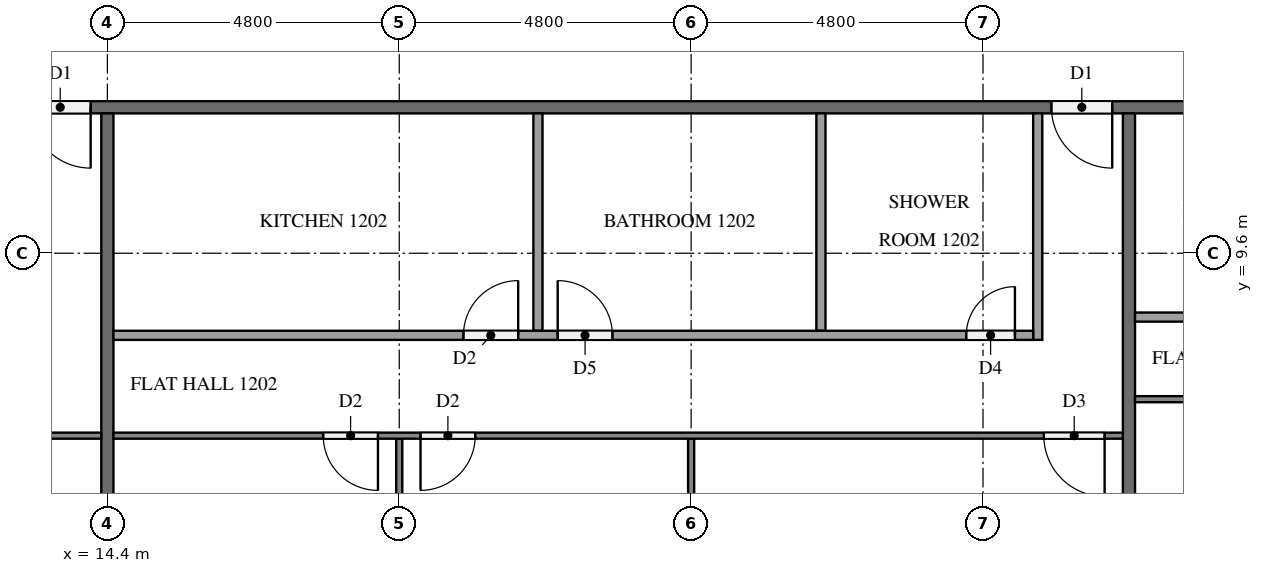
"""IFC4 building model, lengths in metres.
Left out: names, types, materials, properties, quantities, classifications, styles, units other than length and angle.
Written with IfcOpenShell. Run it as: python <this file> out.ifc"""

import sys

from ifc_helpers import new_model, si_unit, direction, frame, frame_2d, origin, place, context, subcontext, project, spatial, rectangle, extrude, element, fill, save


model = new_model("IFC4")
c1 = context("Model", 3, precision=1e-05, world=origin(), true_north=direction((0.0, 1.0)))
c2 = subcontext(c1, "Body", "Model", "MODEL_VIEW")
j1 = project(units=[si_unit("LENGTHUNIT", "METRE"), si_unit("PLANEANGLEUNIT", "RADIAN")], contexts=[c1])
p1 = place(None, origin())
s1 = spatial("IfcSite", under=j1, at=p1, CompositionType="ELEMENT")
p2 = place(p1, origin())
s2 = spatial("IfcBuilding", under=s1, at=p2, CompositionType="ELEMENT")
p3 = place(p2, frame((0.0, 0.0, 50.4)))
s3 = spatial("IfcBuildingStorey", under=s2, at=p3, CompositionType="ELEMENT", Elevation=50.4)
p4 = place(p3, frame((50.5, 12.0, 0.0), z_axis=(0.0, 0.0, 1.0), x_axis=(-1.0, 0.0, 0.0)))
e1 = element("IfcWall", 1, at=p4, inside=s3, PredefinedType="PARTITIONING", context=c2, shape_type="SweptSolid", body=[
    extrude(rectangle(XDim=38.6, YDim=0.2, at=frame_2d((19.3, 0.0))), origin(), (0.0, 0.0, 1.0), 3.1),
])
p5 = place(p4, frame((36.375, 0.0, 0.0)))
e2 = element("IfcOpeningElement", 2, at=p5, cuts=e1, PredefinedType="OPENING", context=c2, shape_type="SweptSolid", body=[
    extrude(rectangle(XDim=1.0, YDim=2.1, at=frame_2d((0.5, 1.05))), frame((0.0, 0.11, 0.0), z_axis=(0.0, -1.0, 0.0), x_axis=(1.0, 0.0, 0.0)), (0.0, 0.0, 1.0), 0.22),
])
p6 = place(p4, frame((19.575, 0.0, 0.0)))
e3 = element("IfcOpeningElement", 3, at=p6, cuts=e1, PredefinedType="OPENING", context=c2, shape_type="SweptSolid", body=[
    extrude(rectangle(XDim=1.0, YDim=2.1, at=frame_2d((0.5, 1.05))), frame((0.0, 0.11, 0.0), z_axis=(0.0, -1.0, 0.0), x_axis=(1.0, 0.0, 0.0)), (0.0, 0.0, 1.0), 0.22),
])
p7 = place(p4, frame((7.575, 0.0, 0.0)))
e4 = element("IfcOpeningElement", 4, at=p7, cuts=e1, PredefinedType="OPENING", context=c2, shape_type="SweptSolid", body=[
    extrude(rectangle(XDim=1.0, YDim=2.1, at=frame_2d((0.5, 1.05))), frame((0.0, 0.11, 0.0), z_axis=(0.0, -1.0, 0.0), x_axis=(1.0, 0.0, 0.0)), (0.0, 0.0, 1.0), 0.22),
])
p8 = place(p4, frame((0.375, 0.0, 0.0)))
e5 = element("IfcOpeningElement", 5, at=p8, cuts=e1, PredefinedType="OPENING", context=c2, shape_type="SweptSolid", body=[
    extrude(rectangle(XDim=1.0, YDim=2.1, at=frame_2d((0.5, 1.05))), frame((0.0, 0.11, 0.0), z_axis=(0.0, -1.0, 0.0), x_axis=(1.0, 0.0, 0.0)), (0.0, 0.0, 1.0), 0.22),
])
p9 = place(p3, frame((14.4, 11.9, 0.0), z_axis=(0.0, 0.0, 1.0), x_axis=(0.0, -1.0, 0.0)))
e6 = element("IfcWall", 6, at=p9, inside=s3, PredefinedType="PARTITIONING", context=c2, shape_type="SweptSolid", body=[
    extrude(rectangle(XDim=11.45, YDim=0.2, at=frame_2d((5.725, 0.0))), origin(), (0.0, 0.0, 1.0), 3.1),
])
p10 = place(p3, frame((31.2, 11.9, 0.0), z_axis=(0.0, 0.0, 1.0), x_axis=(0.0, -1.0, 0.0)))
e7 = element("IfcWall", 7, at=p10, inside=s3, PredefinedType="PARTITIONING", context=c2, shape_type="SweptSolid", body=[
    extrude(rectangle(XDim=11.8, YDim=0.2, at=frame_2d((5.9, 0.0))), origin(), (0.0, 0.0, 1.0), 3.1),
])
p11 = place(p3, frame((14.3, 6.6, 0.0), z_axis=(0.0, 0.0, 1.0), x_axis=(-1.0, 0.0, 0.0)))
e8 = element("IfcWall", 8, at=p11, inside=s3, PredefinedType="PARTITIONING", context=c2, shape_type="SweptSolid", body=[
    extrude(rectangle(XDim=14.2, YDim=0.1, at=frame_2d((7.1, 0.0))), origin(), (0.0, 0.0, 1.0), 3.1),
])
p12 = place(p11, frame((3.45, 0.0, 0.0)))
e9 = element("IfcOpeningElement", 9, at=p12, cuts=e8, PredefinedType="OPENING", context=c2, shape_type="SweptSolid", body=[
    extrude(rectangle(XDim=0.9, YDim=2.1, at=frame_2d((0.45, 1.05))), frame((0.0, 0.06, 0.0), z_axis=(0.0, -1.0, 0.0), x_axis=(1.0, 0.0, 0.0)), (0.0, 0.0, 1.0), 0.12),
])
p13 = place(p11, frame((5.05, 0.0, 0.0)))
e10 = element("IfcOpeningElement", 10, at=p13, cuts=e8, PredefinedType="OPENING", context=c2, shape_type="SweptSolid", body=[
    extrude(rectangle(XDim=0.9, YDim=2.1, at=frame_2d((0.45, 1.05))), frame((0.0, 0.06, 0.0), z_axis=(0.0, -1.0, 0.0), x_axis=(1.0, 0.0, 0.0)), (0.0, 0.0, 1.0), 0.12),
])
p14 = place(p11, frame((12.6, 0.0, 0.0)))
e11 = element("IfcOpeningElement", 11, at=p14, cuts=e8, PredefinedType="OPENING", context=c2, shape_type="SweptSolid", body=[
    extrude(rectangle(XDim=1.0, YDim=2.1, at=frame_2d((0.5, 1.05))), frame((0.0, 0.06, 0.0), z_axis=(0.0, -1.0, 0.0), x_axis=(1.0, 0.0, 0.0)), (0.0, 0.0, 1.0), 0.12),
])
p15 = place(p3, frame((24.0, 6.55, 0.0), z_axis=(0.0, 0.0, 1.0), x_axis=(0.0, -1.0, 0.0)))
e12 = element("IfcWall", 12, at=p15, inside=s3, PredefinedType="PARTITIONING", context=c2, shape_type="SweptSolid", body=[
    extrude(rectangle(XDim=6.1, YDim=0.1, at=frame_2d((3.05, 0.0))), origin(), (0.0, 0.0, 1.0), 3.1),
])
p16 = place(p3, frame((19.2, 6.55, 0.0), z_axis=(0.0, 0.0, 1.0), x_axis=(0.0, -1.0, 0.0)))
e13 = element("IfcWall", 13, at=p16, inside=s3, PredefinedType="PARTITIONING", context=c2, shape_type="SweptSolid", body=[
    extrude(rectangle(XDim=6.45, YDim=0.1, at=frame_2d((3.225, 0.0))), origin(), (0.0, 0.0, 1.0), 3.1),
])
p17 = place(p3, frame((31.1, 6.6, 0.0), z_axis=(0.0, 0.0, 1.0), x_axis=(-1.0, 0.0, 0.0)))
e14 = element("IfcWall", 14, at=p17, inside=s3, PredefinedType="PARTITIONING", context=c2, shape_type="SweptSolid", body=[
    extrude(rectangle(XDim=16.6, YDim=0.1, at=frame_2d((8.3, 0.0))), origin(), (0.0, 0.0, 1.0), 3.1),
])
p18 = place(p17, frame((0.3, 0.0, 0.0)))
e15 = element("IfcOpeningElement", 15, at=p18, cuts=e14, PredefinedType="OPENING", context=c2, shape_type="SweptSolid", body=[
    extrude(rectangle(XDim=1.0, YDim=2.1, at=frame_2d((0.5, 1.05))), frame((0.0, 0.06, 0.0), z_axis=(0.0, -1.0, 0.0), x_axis=(1.0, 0.0, 0.0)), (0.0, 0.0, 1.0), 0.12),
])
p19 = place(p17, frame((10.65, 0.0, 0.0)))
e16 = element("IfcOpeningElement", 16, at=p19, cuts=e14, PredefinedType="OPENING", context=c2, shape_type="SweptSolid", body=[
    extrude(rectangle(XDim=0.9, YDim=2.1, at=frame_2d((0.45, 1.05))), frame((0.0, 0.06, 0.0), z_axis=(0.0, -1.0, 0.0), x_axis=(1.0, 0.0, 0.0)), (0.0, 0.0, 1.0), 0.12),
])
p20 = place(p17, frame((12.25, 0.0, 0.0)))
e17 = element("IfcOpeningElement", 17, at=p20, cuts=e14, PredefinedType="OPENING", context=c2, shape_type="SweptSolid", body=[
    extrude(rectangle(XDim=0.9, YDim=2.1, at=frame_2d((0.45, 1.05))), frame((0.0, 0.06, 0.0), z_axis=(0.0, -1.0, 0.0), x_axis=(1.0, 0.0, 0.0)), (0.0, 0.0, 1.0), 0.12),
])
for number, where, z_axis, x_axis in (
    (18, (26.135, 11.9, 0.0), (0.0, 0.0, 1.0), (0.0, -1.0, 0.0)),
    (19, (21.481, 11.9, 0.0), (0.0, 0.0, 1.0), (0.0, -1.0, 0.0)),
):
    element("IfcWall", number, at=place(p3, frame(where, z_axis=z_axis, x_axis=x_axis)), inside=s3, PredefinedType="PARTITIONING", context=c2, shape_type="SweptSolid", body=[
        extrude(rectangle(XDim=3.575, YDim=0.15, at=frame_2d((1.788, 0.0))), origin(), (0.0, 0.0, 1.0), 3.1),
    ])
p21 = place(p3, frame((29.7, 11.9, 0.0), z_axis=(0.0, 0.0, 1.0), x_axis=(0.0, -1.0, 0.0)))
e20 = element("IfcWall", 20, at=p21, inside=s3, PredefinedType="PARTITIONING", context=c2, shape_type="SweptSolid", body=[
    extrude(rectangle(XDim=3.725, YDim=0.15, at=frame_2d((1.862, 0.0))), origin(), (0.0, 0.0, 1.0), 3.1),
])
p22 = place(p3, frame((14.5, 8.25, 0.0), z_axis=(0.0, 0.0, 1.0), x_axis=(1.0, 0.0, 0.0)))
e21 = element("IfcWall", 21, at=p22, inside=s3, PredefinedType="PARTITIONING", context=c2, shape_type="SweptSolid", body=[
    extrude(rectangle(XDim=15.125, YDim=0.15, at=frame_2d((7.562, 0.0))), origin(), (0.0, 0.0, 1.0), 3.1),
])
p23 = place(p22, frame((14.025, 0.0, 0.0)))
e22 = element("IfcOpeningElement", 22, at=p23, cuts=e21, PredefinedType="OPENING", context=c2, shape_type="SweptSolid", body=[
    extrude(rectangle(XDim=0.8, YDim=2.1, at=frame_2d((0.4, 1.05))), frame((0.0, 0.085, 0.0), z_axis=(0.0, -1.0, 0.0), x_axis=(1.0, 0.0, 0.0)), (0.0, 0.0, 1.0), 0.17),
])
p24 = place(p22, frame((7.306, 0.0, 0.0)))
e23 = element("IfcOpeningElement", 23, at=p24, cuts=e21, PredefinedType="OPENING", context=c2, shape_type="SweptSolid", body=[
    extrude(rectangle(XDim=0.9, YDim=2.1, at=frame_2d((0.45, 1.05))), frame((0.0, 0.085, 0.0), z_axis=(0.0, -1.0, 0.0), x_axis=(1.0, 0.0, 0.0)), (0.0, 0.0, 1.0), 0.17),
])
p25 = place(p22, frame((5.756, 0.0, 0.0)))
e24 = element("IfcOpeningElement", 24, at=p25, cuts=e21, PredefinedType="OPENING", context=c2, shape_type="SweptSolid", body=[
    extrude(rectangle(XDim=0.9, YDim=2.1, at=frame_2d((0.45, 1.05))), frame((0.0, 0.085, 0.0), z_axis=(0.0, -1.0, 0.0), x_axis=(1.0, 0.0, 0.0)), (0.0, 0.0, 1.0), 0.17),
])
p26 = place(p3, frame((43.1, 7.2, 0.0), z_axis=(0.0, 0.0, 1.0), x_axis=(-1.0, 0.0, 0.0)))
e25 = element("IfcWall", 25, at=p26, inside=s3, PredefinedType="PARTITIONING", context=c2, shape_type="SweptSolid", body=[
    extrude(rectangle(XDim=11.8, YDim=0.1, at=frame_2d((5.9, 0.0))), origin(), (0.0, 0.0, 1.0), 3.1),
])
p27 = place(p26, frame((3.45, 0.0, 0.0)))
e26 = element("IfcOpeningElement", 26, at=p27, cuts=e25, PredefinedType="OPENING", context=c2, shape_type="SweptSolid", body=[
    extrude(rectangle(XDim=0.9, YDim=2.1, at=frame_2d((0.45, 1.05))), frame((0.0, 0.06, 0.0), z_axis=(0.0, -1.0, 0.0), x_axis=(1.0, 0.0, 0.0)), (0.0, 0.0, 1.0), 0.12),
])
p28 = place(p26, frame((5.05, 0.0, 0.0)))
e27 = element("IfcOpeningElement", 27, at=p28, cuts=e25, PredefinedType="OPENING", context=c2, shape_type="SweptSolid", body=[
    extrude(rectangle(XDim=1.0, YDim=2.1, at=frame_2d((0.5, 1.05))), frame((0.0, 0.06, 0.0), z_axis=(0.0, -1.0, 0.0), x_axis=(1.0, 0.0, 0.0)), (0.0, 0.0, 1.0), 0.12),
])
p29 = place(p3, frame((31.3, 8.55, 0.0), z_axis=(0.0, 0.0, 1.0), x_axis=(1.0, 0.0, 0.0)))
e28 = element("IfcWall", 28, at=p29, inside=s3, PredefinedType="PARTITIONING", context=c2, shape_type="SweptSolid", body=[
    extrude(rectangle(XDim=10.325, YDim=0.15, at=frame_2d((5.163, 0.0))), origin(), (0.0, 0.0, 1.0), 3.1),
])
p30 = place(p29, frame((4.455, 0.0, 0.0)))
e29 = element("IfcOpeningElement", 29, at=p30, cuts=e28, PredefinedType="OPENING", context=c2, shape_type="SweptSolid", body=[
    extrude(rectangle(XDim=0.9, YDim=2.1, at=frame_2d((0.45, 1.05))), frame((0.0, 0.085, 0.0), z_axis=(0.0, -1.0, 0.0), x_axis=(1.0, 0.0, 0.0)), (0.0, 0.0, 1.0), 0.17),
])
p31 = place(p29, frame((3.005, 0.0, 0.0)))
e30 = element("IfcOpeningElement", 30, at=p31, cuts=e28, PredefinedType="OPENING", context=c2, shape_type="SweptSolid", body=[
    extrude(rectangle(XDim=0.8, YDim=2.1, at=frame_2d((0.4, 1.05))), frame((0.0, 0.085, 0.0), z_axis=(0.0, -1.0, 0.0), x_axis=(1.0, 0.0, 0.0)), (0.0, 0.0, 1.0), 0.17),
])
p32 = place(p5, origin())
e31 = element("IfcDoor", 31, at=p32, inside=s3, OperationType="SINGLE_SWING_LEFT", PredefinedType="DOOR", context=c2, shape_type="SweptSolid", body=[
    extrude(rectangle(XDim=1.0, YDim=2.1, at=frame_2d((0.5, 1.05))), frame((0.0, 0.025, 0.0), z_axis=(0.0, -1.0, 0.0), x_axis=(1.0, 0.0, 0.0)), (0.0, 0.0, 1.0), 0.05),
])
fill(e2, e31)
p33 = place(p6, origin())
e32 = element("IfcDoor", 32, at=p33, inside=s3, OperationType="SINGLE_SWING_LEFT", PredefinedType="DOOR", context=c2, shape_type="SweptSolid", body=[
    extrude(rectangle(XDim=1.0, YDim=2.1, at=frame_2d((0.5, 1.05))), frame((0.0, 0.025, 0.0), z_axis=(0.0, -1.0, 0.0), x_axis=(1.0, 0.0, 0.0)), (0.0, 0.0, 1.0), 0.05),
])
fill(e3, e32)
p34 = place(p18, origin())
e33 = element("IfcDoor", 33, at=p34, inside=s3, OperationType="SINGLE_SWING_LEFT", PredefinedType="DOOR", context=c2, shape_type="SweptSolid", body=[
    extrude(rectangle(XDim=1.0, YDim=2.1, at=frame_2d((0.5, 1.05))), frame((0.0, 0.025, 0.0), z_axis=(0.0, -1.0, 0.0), x_axis=(1.0, 0.0, 0.0)), (0.0, 0.0, 1.0), 0.05),
])
fill(e15, e33)
p35 = place(p19, origin())
e34 = element("IfcDoor", 34, at=p35, inside=s3, OperationType="SINGLE_SWING_RIGHT", PredefinedType="DOOR", context=c2, shape_type="SweptSolid", body=[
    extrude(rectangle(XDim=0.9, YDim=2.1, at=frame_2d((0.45, 1.05))), frame((0.0, 0.025, 0.0), z_axis=(0.0, -1.0, 0.0), x_axis=(1.0, 0.0, 0.0)), (0.0, 0.0, 1.0), 0.05),
])
fill(e16, e34)
p36 = place(p20, origin())
e35 = element("IfcDoor", 35, at=p36, inside=s3, OperationType="SINGLE_SWING_LEFT", PredefinedType="DOOR", context=c2, shape_type="SweptSolid", body=[
    extrude(rectangle(XDim=0.9, YDim=2.1, at=frame_2d((0.45, 1.05))), frame((0.0, 0.025, 0.0), z_axis=(0.0, -1.0, 0.0), x_axis=(1.0, 0.0, 0.0)), (0.0, 0.0, 1.0), 0.05),
])
fill(e17, e35)
p37 = place(p23, origin())
e36 = element("IfcDoor", 36, at=p37, inside=s3, OperationType="SINGLE_SWING_RIGHT", PredefinedType="DOOR", context=c2, shape_type="SweptSolid", body=[
    extrude(rectangle(XDim=0.8, YDim=2.1, at=frame_2d((0.4, 1.05))), frame((0.0, 0.025, 0.0), z_axis=(0.0, -1.0, 0.0), x_axis=(1.0, 0.0, 0.0)), (0.0, 0.0, 1.0), 0.05),
])
fill(e22, e36)
p38 = place(p24, origin())
e37 = element("IfcDoor", 37, at=p38, inside=s3, OperationType="SINGLE_SWING_LEFT", PredefinedType="DOOR", context=c2, shape_type="SweptSolid", body=[
    extrude(rectangle(XDim=0.9, YDim=2.1, at=frame_2d((0.45, 1.05))), frame((0.0, 0.025, 0.0), z_axis=(0.0, -1.0, 0.0), x_axis=(1.0, 0.0, 0.0)), (0.0, 0.0, 1.0), 0.05),
])
fill(e23, e37)
p39 = place(p25, origin())
e38 = element("IfcDoor", 38, at=p39, inside=s3, OperationType="SINGLE_SWING_RIGHT", PredefinedType="DOOR", context=c2, shape_type="SweptSolid", body=[
    extrude(rectangle(XDim=0.9, YDim=2.1, at=frame_2d((0.45, 1.05))), frame((0.0, 0.025, 0.0), z_axis=(0.0, -1.0, 0.0), x_axis=(1.0, 0.0, 0.0)), (0.0, 0.0, 1.0), 0.05),
])
fill(e24, e38)
save(model, sys.argv[1])
